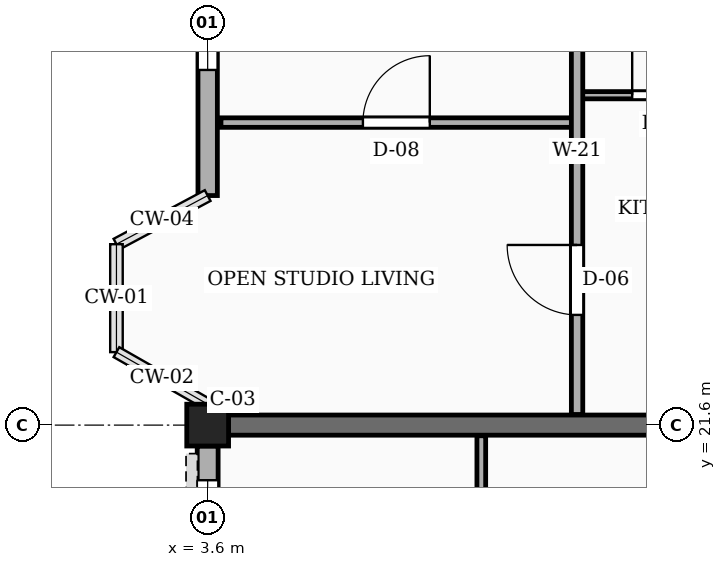
"""IFC4 building model, lengths in metres.
Left out: names, types, materials, properties, quantities, classifications, styles, units other than length and angle.
Written with IfcOpenShell. Run it as: python <this file> out.ifc"""

import sys

from ifc_helpers import new_model, si_unit, direction, frame, frame_2d, origin, origin_2d, place, context, subcontext, project, spatial, rectangle, extrude, element, fill, save


model = new_model("IFC4")
c1 = context("Model", 3, precision=1e-05, world=origin(), true_north=direction((0.0, 1.0)))
c2 = subcontext(c1, "Body", "Model", "MODEL_VIEW")
j1 = project(units=[si_unit("LENGTHUNIT", "METRE"), si_unit("PLANEANGLEUNIT", "RADIAN")], contexts=[c1])
p1 = place(None, origin())
s1 = spatial("IfcSite", under=j1, at=p1, CompositionType="ELEMENT")
p2 = place(p1, origin())
s2 = spatial("IfcBuilding", under=s1, at=p2, CompositionType="ELEMENT")
p3 = place(p2, frame((0.0, 0.0, 10.8)))
s3 = spatial("IfcBuildingStorey", under=s2, at=p3, CompositionType="ELEMENT", Elevation=10.8)
p4 = place(p3, frame((3.6, 21.6, 0.0), z_axis=(0.0, 0.0, 1.0), x_axis=(1.0, 0.0, 0.0)))
e1 = element("IfcColumn", 1, at=p4, inside=s3, PredefinedType="COLUMN", context=c2, shape_type="SweptSolid", body=[
    extrude(rectangle(XDim=0.55, YDim=0.55, at=origin_2d()), origin(), (0.0, 0.0, 1.0), 3.15),
])
p5 = place(p3, frame((3.875, 21.6, 0.0), z_axis=(0.0, 0.0, 1.0), x_axis=(1.0, 0.0, 0.0)))
e2 = element("IfcWall", 2, at=p5, inside=s3, PredefinedType="SOLIDWALL", context=c2, shape_type="SweptSolid", body=[
    extrude(rectangle(XDim=6.7, YDim=0.265, at=frame_2d((3.35, 0.0))), origin(), (0.0, 0.0, 1.0), 2.17),
])
p6 = place(p3, frame((3.6, 28.525, 0.0), z_axis=(0.0, 0.0, 1.0), x_axis=(0.0, -1.0, 0.0)))
e3 = element("IfcWall", 3, at=p6, inside=s3, PredefinedType="SOLIDWALL", context=c2, shape_type="SweptSolid", body=[
    extrude(rectangle(XDim=3.905, YDim=0.255, at=frame_2d((1.952, 0.0))), origin(), (0.0, 0.0, 1.0), 2.44),
])
p7 = place(p6, frame((0.802, 0.0, 0.78)))
e4 = element("IfcOpeningElement", 4, at=p7, cuts=e3, PredefinedType="OPENING", context=c2, shape_type="SweptSolid", body=[
    extrude(rectangle(XDim=1.45, YDim=1.44, at=frame_2d((0.725, 0.72))), frame((0.0, 0.137, 0.0), z_axis=(0.0, -1.0, 0.0), x_axis=(1.0, 0.0, 0.0)), (0.0, 0.0, 1.0), 0.275),
])
p8 = place(p3, frame((3.6, 21.325, 0.0), z_axis=(0.0, 0.0, 1.0), x_axis=(0.0, -1.0, 0.0)))
e5 = element("IfcWall", 5, at=p8, inside=s3, PredefinedType="SOLIDWALL", context=c2, shape_type="SweptSolid", body=[
    extrude(rectangle(XDim=6.65, YDim=0.275, at=frame_2d((3.325, 0.0))), origin(), (0.0, 0.0, 1.0), 2.44),
])
p9 = place(p8, frame((0.45, 0.0, 0.78)))
e6 = element("IfcOpeningElement", 6, at=p9, cuts=e5, PredefinedType="OPENING", context=c2, shape_type="SweptSolid", body=[
    extrude(rectangle(XDim=0.85, YDim=1.15, at=frame_2d((0.425, 0.575))), frame((0.0, 0.147, 0.0), z_axis=(0.0, -1.0, 0.0), x_axis=(1.0, 0.0, 0.0)), (0.0, 0.0, 1.0), 0.295),
])
p10 = place(p8, frame((4.65, 0.0, 0.78)))
e7 = element("IfcOpeningElement", 7, at=p10, cuts=e5, PredefinedType="OPENING", context=c2, shape_type="SweptSolid", body=[
    extrude(rectangle(XDim=1.0, YDim=1.15, at=frame_2d((0.5, 0.575))), frame((0.0, 0.147, 0.0), z_axis=(0.0, -1.0, 0.0), x_axis=(1.0, 0.0, 0.0)), (0.0, 0.0, 1.0), 0.295),
])
p11 = place(p3, frame((7.2, 14.54, 0.0), z_axis=(0.0, 0.0, 1.0), x_axis=(0.0, 1.0, 0.0)))
e8 = element("IfcWall", 8, at=p11, inside=s3, PredefinedType="PARTITIONING", context=c2, shape_type="SweptSolid", body=[
    extrude(rectangle(XDim=6.92, YDim=0.115, at=frame_2d((3.46, 0.0))), origin(), (0.0, 0.0, 1.0), 2.305),
])
p12 = place(p11, frame((1.05, 0.0, 0.0)))
e9 = element("IfcOpeningElement", 9, at=p12, cuts=e8, PredefinedType="OPENING", context=c2, shape_type="SweptSolid", body=[
    extrude(rectangle(XDim=0.87, YDim=2.05, at=frame_2d((0.435, 1.025))), frame((0.0, 0.067, 0.0), z_axis=(0.0, -1.0, 0.0), x_axis=(1.0, 0.0, 0.0)), (0.0, 0.0, 1.0), 0.135),
])
p13 = place(p11, frame((4.45, 0.0, 0.0)))
e10 = element("IfcOpeningElement", 10, at=p13, cuts=e8, PredefinedType="OPENING", context=c2, shape_type="SweptSolid", body=[
    extrude(rectangle(XDim=0.88, YDim=2.08, at=frame_2d((0.44, 1.04))), frame((0.0, 0.067, 0.0), z_axis=(0.0, -1.0, 0.0), x_axis=(1.0, 0.0, 0.0)), (0.0, 0.0, 1.0), 0.135),
])
p14 = place(p3, frame((3.775, 25.58, 0.0), z_axis=(0.0, 0.0, 1.0), x_axis=(1.0, 0.0, 0.0)))
e11 = element("IfcWall", 11, at=p14, inside=s3, PredefinedType="PARTITIONING", context=c2, shape_type="SweptSolid", body=[
    extrude(rectangle(XDim=4.615, YDim=0.125, at=frame_2d((2.308, 0.0))), origin(), (0.0, 0.0, 1.0), 2.305),
])
p15 = place(p14, frame((1.867, 0.0, 0.0)))
e12 = element("IfcOpeningElement", 12, at=p15, cuts=e11, PredefinedType="OPENING", context=c2, shape_type="SweptSolid", body=[
    extrude(rectangle(XDim=0.88, YDim=2.08, at=frame_2d((0.44, 1.04))), frame((0.0, 0.073, 0.0), z_axis=(0.0, -1.0, 0.0), x_axis=(1.0, 0.0, 0.0)), (0.0, 0.0, 1.0), 0.145),
])
p16 = place(p3, frame((8.53, 25.94, 0.0), z_axis=(0.0, 0.0, 1.0), x_axis=(1.0, 0.0, 0.0)))
e13 = element("IfcWall", 13, at=p16, inside=s3, PredefinedType="PARTITIONING", context=c2, shape_type="SweptSolid", body=[
    extrude(rectangle(XDim=2.18, YDim=0.095, at=frame_2d((1.09, 0.0))), origin(), (0.0, 0.0, 1.0), 2.305),
])
p17 = place(p16, frame((0.655, 0.0, 0.0)))
e14 = element("IfcOpeningElement", 14, at=p17, cuts=e13, PredefinedType="OPENING", context=c2, shape_type="SweptSolid", body=[
    extrude(rectangle(XDim=0.87, YDim=2.05, at=frame_2d((0.435, 1.025))), frame((0.0, 0.058, 0.0), z_axis=(0.0, -1.0, 0.0), x_axis=(1.0, 0.0, 0.0)), (0.0, 0.0, 1.0), 0.115),
])
p18 = place(p3, frame((8.46, 21.74, 0.0), z_axis=(0.0, 0.0, 1.0), x_axis=(0.0, 1.0, 0.0)))
e15 = element("IfcWall", 15, at=p18, inside=s3, PredefinedType="PARTITIONING", context=c2, shape_type="SweptSolid", body=[
    extrude(rectangle(XDim=6.92, YDim=0.15, at=frame_2d((3.46, 0.0))), origin(), (0.0, 0.0, 1.0), 2.305),
])
p19 = place(p18, frame((1.31, 0.0, 0.0)))
e16 = element("IfcOpeningElement", 16, at=p19, cuts=e15, PredefinedType="OPENING", context=c2, shape_type="SweptSolid", body=[
    extrude(rectangle(XDim=0.92, YDim=2.1, at=frame_2d((0.46, 1.05))), frame((0.0, 0.085, 0.0), z_axis=(0.0, -1.0, 0.0), x_axis=(1.0, 0.0, 0.0)), (0.0, 0.0, 1.0), 0.17),
])
p20 = place(p7, origin())
e17 = element("IfcWindow", 17, at=p20, inside=s3, PartitioningType="SINGLE_PANEL", PredefinedType="WINDOW", context=c2, shape_type="SweptSolid", body=[
    extrude(rectangle(XDim=1.45, YDim=1.44, at=frame_2d((0.725, 0.72))), frame((0.0, 0.03, 0.0), z_axis=(0.0, -1.0, 0.0), x_axis=(1.0, 0.0, 0.0)), (0.0, 0.0, 1.0), 0.06),
])
fill(e4, e17)
p21 = place(p9, origin())
e18 = element("IfcWindow", 18, at=p21, inside=s3, PartitioningType="SINGLE_PANEL", PredefinedType="WINDOW", context=c2, shape_type="SweptSolid", body=[
    extrude(rectangle(XDim=0.85, YDim=1.15, at=frame_2d((0.425, 0.575))), frame((0.0, 0.03, 0.0), z_axis=(0.0, -1.0, 0.0), x_axis=(1.0, 0.0, 0.0)), (0.0, 0.0, 1.0), 0.06),
])
fill(e6, e18)
p22 = place(p15, origin())
e19 = element("IfcDoor", 19, at=p22, inside=s3, OperationType="SINGLE_SWING_RIGHT", PredefinedType="DOOR", context=c2, shape_type="SweptSolid", body=[
    extrude(rectangle(XDim=0.88, YDim=2.08, at=frame_2d((0.44, 1.04))), frame((0.0, 0.025, 0.0), z_axis=(0.0, -1.0, 0.0), x_axis=(1.0, 0.0, 0.0)), (0.0, 0.0, 1.0), 0.05),
])
fill(e12, e19)
p23 = place(p17, origin())
e20 = element("IfcDoor", 20, at=p23, inside=s3, OperationType="SINGLE_SWING_LEFT", PredefinedType="DOOR", context=c2, shape_type="SweptSolid", body=[
    extrude(rectangle(XDim=0.87, YDim=2.05, at=frame_2d((0.435, 1.025))), frame((0.0, 0.025, 0.0), z_axis=(0.0, -1.0, 0.0), x_axis=(1.0, 0.0, 0.0)), (0.0, 0.0, 1.0), 0.05),
])
fill(e14, e20)
p24 = place(p19, origin())
e21 = element("IfcDoor", 21, at=p24, inside=s3, OperationType="SINGLE_SWING_RIGHT", PredefinedType="DOOR", context=c2, shape_type="SweptSolid", body=[
    extrude(rectangle(XDim=0.92, YDim=2.1, at=frame_2d((0.46, 1.05))), frame((0.0, 0.025, 0.0), z_axis=(0.0, -1.0, 0.0), x_axis=(1.0, 0.0, 0.0)), (0.0, 0.0, 1.0), 0.05),
])
fill(e16, e21)
save(model, sys.argv[1])
